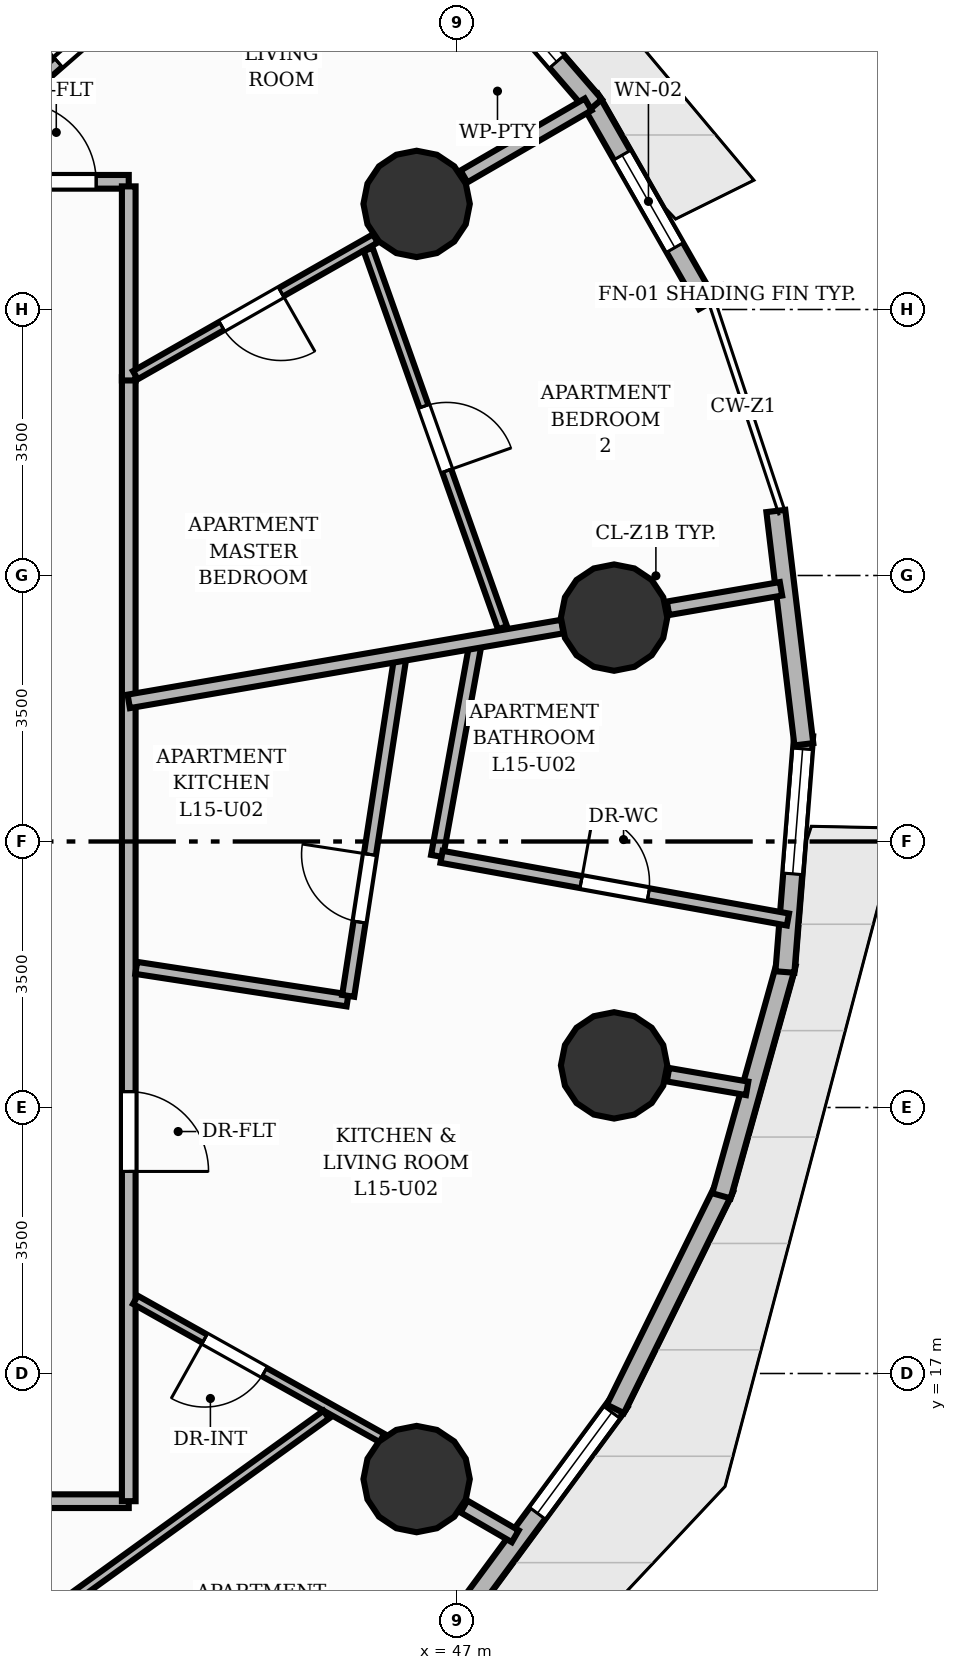
"""IFC4 building model, lengths in metres.
Left out: names, types, materials, properties, quantities, classifications, styles, units other than length and angle.
Written with IfcOpenShell. Run it as: python <this file> out.ifc"""

import sys

from ifc_helpers import new_model, si_unit, direction, frame, frame_2d, origin, origin_2d, place, context, subcontext, project, spatial, rectangle, circle, extrude, element, fill, save


model = new_model("IFC4")
c1 = context("Model", 3, precision=1e-05, world=origin(), true_north=direction((0.0, 1.0)))
c2 = subcontext(c1, "Body", "Model", "MODEL_VIEW")
j1 = project(units=[si_unit("LENGTHUNIT", "METRE"), si_unit("PLANEANGLEUNIT", "RADIAN")], contexts=[c1])
p1 = place(None, origin())
s1 = spatial("IfcSite", under=j1, at=p1, CompositionType="ELEMENT")
p2 = place(p1, origin())
s2 = spatial("IfcBuilding", under=s1, at=p2, CompositionType="ELEMENT")
p3 = place(p2, frame((0.0, 0.0, 53.6)))
s3 = spatial("IfcBuildingStorey", under=s2, at=p3, CompositionType="ELEMENT", Elevation=53.6)
for number, where, z_axis, x_axis in (
    (1, (49.066, 26.946, 0.0), (0.0, 0.0, 1.0), (1.0, 0.0, 0.0)),
    (2, (46.468, 32.389, 0.0), (0.0, 0.0, 1.0), (1.0, 0.0, 0.0)),
    (3, (46.468, 15.611, 0.0), (0.0, 0.0, 1.0), (1.0, 0.0, 0.0)),
    (4, (49.066, 21.054, 0.0), (0.0, 0.0, 1.0), (1.0, 0.0, 0.0)),
):
    element("IfcColumn", number, at=place(p3, frame(where, z_axis=z_axis, x_axis=x_axis)), inside=s3, PredefinedType="COLUMN", context=c2, shape_type="SweptSolid", body=[
        extrude(circle(Radius=0.7, at=origin_2d()), origin(), (0.0, 0.0, 1.0), 3.2),
    ])
p4 = place(p3, frame((48.744, 33.777, 0.0), z_axis=(0.0, 0.0, 1.0), x_axis=(0.496155788519, -0.868233513243, 0.0)))
e5 = element("IfcWall", 5, at=p4, inside=s3, PredefinedType="SOLIDWALL", context=c2, shape_type="SweptSolid", body=[
    extrude(rectangle(XDim=3.121, YDim=0.25, at=frame_2d((1.56, 0.0))), origin(), (0.0, 0.0, 1.0), 2.96),
])
p5 = place(p4, frame((0.86, 0.0, 0.85)))
e6 = element("IfcOpeningElement", 6, at=p5, cuts=e5, PredefinedType="OPENING", context=c2, shape_type="SweptSolid", body=[
    extrude(rectangle(XDim=1.4, YDim=1.55, at=frame_2d((0.7, 0.775))), frame((0.0, 0.135, 0.0), z_axis=(0.0, -1.0, 0.0), x_axis=(1.0, 0.0, 0.0)), (0.0, 0.0, 1.0), 0.27),
])
p6 = place(p3, frame((46.734, 36.086, 0.0), z_axis=(0.0, 0.0, 1.0), x_axis=(0.653770062489, -0.75669327035, 0.0)))
e7 = element("IfcWall", 7, at=p6, inside=s3, PredefinedType="SOLIDWALL", context=c2, shape_type="SweptSolid", body=[
    extrude(rectangle(XDim=3.174, YDim=0.25, at=frame_2d((1.587, 0.0))), origin(), (0.0, 0.0, 1.0), 2.96),
])
p7 = place(p6, frame((0.762, 0.0, 0.85)))
e8 = element("IfcOpeningElement", 8, at=p7, cuts=e7, PredefinedType="OPENING", context=c2, shape_type="SweptSolid", body=[
    extrude(rectangle(XDim=1.65, YDim=1.55, at=frame_2d((0.825, 0.775))), frame((0.0, 0.135, 0.0), z_axis=(0.0, -1.0, 0.0), x_axis=(1.0, 0.0, 0.0)), (0.0, 0.0, 1.0), 0.27),
])
p8 = place(p3, frame((49.14, 16.629, 0.0), z_axis=(0.0, 0.0, 1.0), x_axis=(-0.593762827217, -0.804640109003, 0.0)))
e9 = element("IfcWall", 9, at=p8, inside=s3, PredefinedType="SOLIDWALL", context=c2, shape_type="SweptSolid", body=[
    extrude(rectangle(XDim=3.323, YDim=0.25, at=frame_2d((1.661, 0.0))), origin(), (0.0, 0.0, 1.0), 2.96),
])
p9 = place(p8, frame((0.175, 0.0, 0.85)))
e10 = element("IfcOpeningElement", 10, at=p9, cuts=e9, PredefinedType="OPENING", context=c2, shape_type="SweptSolid", body=[
    extrude(rectangle(XDim=1.65, YDim=1.55, at=frame_2d((0.825, 0.775))), frame((0.0, 0.135, 0.0), z_axis=(0.0, -1.0, 0.0), x_axis=(1.0, 0.0, 0.0)), (0.0, 0.0, 1.0), 0.27),
])
p10 = place(p3, frame((50.518, 19.443, 0.0), z_axis=(0.0, 0.0, 1.0), x_axis=(-0.44260255462, -0.896717892452, 0.0)))
e11 = element("IfcWall", 11, at=p10, inside=s3, PredefinedType="SOLIDWALL", context=c2, shape_type="SweptSolid", body=[
    extrude(rectangle(XDim=3.245, YDim=0.25, at=frame_2d((1.622, 0.0))), origin(), (0.0, 0.0, 1.0), 2.96),
])
p11 = place(p3, frame((51.333, 22.395, 0.0), z_axis=(0.0, 0.0, 1.0), x_axis=(-0.269353183383, -0.963041464632, 0.0)))
e12 = element("IfcWall", 12, at=p11, inside=s3, PredefinedType="SOLIDWALL", context=c2, shape_type="SweptSolid", body=[
    extrude(rectangle(XDim=3.174, YDim=0.25, at=frame_2d((1.587, 0.0))), origin(), (0.0, 0.0, 1.0), 2.96),
])
p12 = place(p3, frame((51.56, 25.394, 0.0), z_axis=(0.0, 0.0, 1.0), x_axis=(-0.079173066737, -0.996860885733, 0.0)))
e13 = element("IfcWall", 13, at=p12, inside=s3, PredefinedType="SOLIDWALL", context=c2, shape_type="SweptSolid", body=[
    extrude(rectangle(XDim=3.121, YDim=0.25, at=frame_2d((1.56, 0.0))), origin(), (0.0, 0.0, 1.0), 2.96),
])
p13 = place(p12, frame((0.175, 0.0, 0.85)))
e14 = element("IfcOpeningElement", 14, at=p13, cuts=e13, PredefinedType="OPENING", context=c2, shape_type="SweptSolid", body=[
    extrude(rectangle(XDim=1.65, YDim=1.55, at=frame_2d((0.825, 0.775))), frame((0.0, 0.135, 0.0), z_axis=(0.0, -1.0, 0.0), x_axis=(1.0, 0.0, 0.0)), (0.0, 0.0, 1.0), 0.27),
])
p14 = place(p3, frame((51.194, 28.349, 0.0), z_axis=(0.0, 0.0, 1.0), x_axis=(0.119310240224, -0.992857022223, 0.0)))
e15 = element("IfcWall", 15, at=p14, inside=s3, PredefinedType="SOLIDWALL", context=c2, shape_type="SweptSolid", body=[
    extrude(rectangle(XDim=3.092, YDim=0.25, at=frame_2d((1.546, 0.0))), origin(), (0.0, 0.0, 1.0), 2.96),
])
p15 = place(p3, frame((49.775, 27.068, 0.0), z_axis=(0.0, 0.0, 1.0), x_axis=(0.985418960314, 0.170145445587, 0.0)))
e16 = element("IfcWall", 16, at=p15, inside=s3, PredefinedType="PARTITIONING", context=c2, shape_type="SweptSolid", body=[
    extrude(rectangle(XDim=1.508, YDim=0.18, at=frame_2d((0.754, 0.0))), origin(), (0.0, 0.0, 1.0), 2.178),
])
p16 = place(p3, frame((47.091, 32.75, 0.0), z_axis=(0.0, 0.0, 1.0), x_axis=(0.865027823723, 0.501723892379, 0.0)))
e17 = element("IfcWall", 17, at=p16, inside=s3, PredefinedType="PARTITIONING", context=c2, shape_type="SweptSolid", body=[
    extrude(rectangle(XDim=1.889, YDim=0.18, at=frame_2d((0.944, 0.0))), origin(), (0.0, 0.0, 1.0), 2.178),
])
p17 = place(p3, frame((47.091, 15.25, 0.0), z_axis=(0.0, 0.0, 1.0), x_axis=(0.86504748832, -0.501689986895, 0.0)))
e18 = element("IfcWall", 18, at=p17, inside=s3, PredefinedType="PARTITIONING", context=c2, shape_type="SweptSolid", body=[
    extrude(rectangle(XDim=0.78, YDim=0.18, at=frame_2d((0.39, 0.0))), origin(), (0.0, 0.0, 1.0), 2.178),
])
p18 = place(p3, frame((49.775, 20.932, 0.0), z_axis=(0.0, 0.0, 1.0), x_axis=(0.985428074572, -0.17009265077, 0.0)))
e19 = element("IfcWall", 19, at=p18, inside=s3, PredefinedType="PARTITIONING", context=c2, shape_type="SweptSolid", body=[
    extrude(rectangle(XDim=1.056, YDim=0.18, at=frame_2d((0.528, 0.0))), origin(), (0.0, 0.0, 1.0), 2.178),
])
p19 = place(p3, frame((42.68, 15.32, 0.0), z_axis=(0.0, 0.0, 1.0), x_axis=(-1.0, 0.0, 0.0)))
e20 = element("IfcWall", 20, at=p19, inside=s3, PredefinedType="PARTITIONING", context=c2, shape_type="SweptSolid", body=[
    extrude(rectangle(XDim=13.87, YDim=0.18, at=frame_2d((6.935, 0.0))), origin(), (0.0, 0.0, 1.0), 2.955),
])
p20 = place(p19, frame((9.866, 0.0, 0.0)))
e21 = element("IfcOpeningElement", 21, at=p20, cuts=e20, PredefinedType="OPENING", context=c2, shape_type="SweptSolid", body=[
    extrude(rectangle(XDim=0.9, YDim=2.1, at=frame_2d((0.45, 1.05))), frame((0.0, 0.1, 0.0), z_axis=(0.0, -1.0, 0.0), x_axis=(1.0, 0.0, 0.0)), (0.0, 0.0, 1.0), 0.2),
])
p21 = place(p3, frame((42.68, 30.109, 0.0), z_axis=(0.0, 0.0, 1.0), x_axis=(0.0, -1.0, 0.0)))
e22 = element("IfcWall", 22, at=p21, inside=s3, PredefinedType="PARTITIONING", context=c2, shape_type="SweptSolid", body=[
    extrude(rectangle(XDim=14.789, YDim=0.18, at=frame_2d((7.395, 0.0))), origin(), (0.0, 0.0, 1.0), 2.955),
])
p22 = place(p21, frame((9.4, 0.0, 0.0)))
e23 = element("IfcOpeningElement", 23, at=p22, cuts=e22, PredefinedType="OPENING", context=c2, shape_type="SweptSolid", body=[
    extrude(rectangle(XDim=1.05, YDim=2.15, at=frame_2d((0.525, 1.075))), frame((0.0, 0.1, 0.0), z_axis=(0.0, -1.0, 0.0), x_axis=(1.0, 0.0, 0.0)), (0.0, 0.0, 1.0), 0.2),
])
p23 = place(p3, frame((33.988, 32.68, 0.0), z_axis=(0.0, 0.0, 1.0), x_axis=(1.0, 0.0, 0.0)))
e24 = element("IfcWall", 24, at=p23, inside=s3, PredefinedType="PARTITIONING", context=c2, shape_type="SweptSolid", body=[
    extrude(rectangle(XDim=8.692, YDim=0.18, at=frame_2d((4.346, 0.0))), origin(), (0.0, 0.0, 1.0), 2.955),
])
p24 = place(p23, frame((7.213, 0.0, 0.0)))
e25 = element("IfcOpeningElement", 25, at=p24, cuts=e24, PredefinedType="OPENING", context=c2, shape_type="SweptSolid", body=[
    extrude(rectangle(XDim=1.05, YDim=2.15, at=frame_2d((0.525, 1.075))), frame((0.0, 0.1, 0.0), z_axis=(0.0, -1.0, 0.0), x_axis=(1.0, 0.0, 0.0)), (0.0, 0.0, 1.0), 0.2),
])
p25 = place(p3, frame((42.68, 32.62, 0.0), z_axis=(0.0, 0.0, 1.0), x_axis=(0.0, -1.0, 0.0)))
e26 = element("IfcWall", 26, at=p25, inside=s3, PredefinedType="PARTITIONING", context=c2, shape_type="SweptSolid", body=[
    extrude(rectangle(XDim=2.554, YDim=0.18, at=frame_2d((1.277, 0.0))), origin(), (0.0, 0.0, 1.0), 2.955),
])
p26 = place(p3, frame((47.248, 26.632, 0.0), z_axis=(0.0, 0.0, 1.0), x_axis=(-0.1781964362, -0.983994933994, 0.0)))
e27 = element("IfcWall", 27, at=p26, inside=s3, PredefinedType="PLUMBINGWALL", context=c2, shape_type="SweptSolid", body=[
    extrude(rectangle(XDim=2.869, YDim=0.16, at=frame_2d((1.435, 0.0))), origin(), (0.0, 0.0, 1.0), 2.955),
])
p27 = place(p3, frame((46.796, 23.799, 0.0), z_axis=(0.0, 0.0, 1.0), x_axis=(0.983988618973, -0.178231304015, 0.0)))
e28 = element("IfcWall", 28, at=p27, inside=s3, PredefinedType="PLUMBINGWALL", context=c2, shape_type="SweptSolid", body=[
    extrude(rectangle(XDim=4.631, YDim=0.16, at=frame_2d((2.316, 0.0))), origin(), (0.0, 0.0, 1.0), 2.955),
])
p28 = place(p27, frame((1.866, 0.0, 0.0)))
e29 = element("IfcOpeningElement", 29, at=p28, cuts=e28, PredefinedType="OPENING", context=c2, shape_type="SweptSolid", body=[
    extrude(rectangle(XDim=0.9, YDim=2.1, at=frame_2d((0.45, 1.05))), frame((0.0, 0.09, 0.0), z_axis=(0.0, -1.0, 0.0), x_axis=(1.0, 0.0, 0.0)), (0.0, 0.0, 1.0), 0.18),
])
p29 = place(p3, frame((46.011, 16.152, 0.0), z_axis=(0.0, 0.0, 1.0), x_axis=(-0.872501537555, 0.488611365978, 0.0)))
e30 = element("IfcWall", 30, at=p29, inside=s3, PredefinedType="PARTITIONING", context=c2, shape_type="SweptSolid", body=[
    extrude(rectangle(XDim=3.719, YDim=0.125, at=frame_2d((1.859, 0.0))), origin(), (0.0, 0.0, 1.0), 2.178),
])
p30 = place(p29, frame((1.773, 0.0, 0.0)))
e31 = element("IfcOpeningElement", 31, at=p30, cuts=e30, PredefinedType="OPENING", context=c2, shape_type="SweptSolid", body=[
    extrude(rectangle(XDim=0.9, YDim=2.1, at=frame_2d((0.45, 1.05))), frame((0.0, 0.073, 0.0), z_axis=(0.0, -1.0, 0.0), x_axis=(1.0, 0.0, 0.0)), (0.0, 0.0, 1.0), 0.145),
])
p31 = place(p3, frame((42.779, 22.337, 0.0), z_axis=(0.0, 0.0, 1.0), x_axis=(0.9883767157, -0.152024563351, 0.0)))
e32 = element("IfcWall", 32, at=p31, inside=s3, PredefinedType="PLUMBINGWALL", context=c2, shape_type="SweptSolid", body=[
    extrude(rectangle(XDim=2.812, YDim=0.16, at=frame_2d((1.406, 0.0))), origin(), (0.0, 0.0, 1.0), 2.178),
])
p32 = place(p3, frame((45.567, 21.969, 0.0), z_axis=(0.0, 0.0, 1.0), x_axis=(0.152061220482, 0.988371076684, 0.0)))
e33 = element("IfcWall", 33, at=p32, inside=s3, PredefinedType="PLUMBINGWALL", context=c2, shape_type="SweptSolid", body=[
    extrude(rectangle(XDim=4.545, YDim=0.16, at=frame_2d((2.273, 0.0))), origin(), (0.0, 0.0, 1.0), 2.955),
])
p33 = place(p32, frame((0.983, 0.0, 0.0)))
e34 = element("IfcOpeningElement", 34, at=p33, cuts=e33, PredefinedType="OPENING", context=c2, shape_type="SweptSolid", body=[
    extrude(rectangle(XDim=0.9, YDim=2.1, at=frame_2d((0.45, 1.05))), frame((0.0, 0.09, 0.0), z_axis=(0.0, -1.0, 0.0), x_axis=(1.0, 0.0, 0.0)), (0.0, 0.0, 1.0), 0.18),
])
p34 = place(p3, frame((42.68, 25.844, 0.0), z_axis=(0.0, 0.0, 1.0), x_axis=(0.985422105898, 0.170127226534, 0.0)))
e35 = element("IfcWall", 35, at=p34, inside=s3, PredefinedType="PARTITIONING", context=c2, shape_type="SweptSolid", body=[
    extrude(rectangle(XDim=5.789, YDim=0.18, at=frame_2d((2.895, 0.0))), origin(), (0.0, 0.0, 1.0), 2.178),
])
p35 = place(p3, frame((45.278, 16.459, 0.0), z_axis=(0.0, 0.0, 1.0), x_axis=(-0.810668637761, -0.585505217526, 0.0)))
e36 = element("IfcWall", 36, at=p35, inside=s3, PredefinedType="PARTITIONING", context=c2, shape_type="SweptSolid", body=[
    extrude(rectangle(XDim=11.55, YDim=0.125, at=frame_2d((5.775, 0.0))), origin(), (0.0, 0.0, 1.0), 2.955),
])
p36 = place(p35, frame((4.625, 0.0, 0.0)))
e37 = element("IfcOpeningElement", 37, at=p36, cuts=e36, PredefinedType="OPENING", context=c2, shape_type="SweptSolid", body=[
    extrude(rectangle(XDim=0.9, YDim=2.1, at=frame_2d((0.45, 1.05))), frame((0.0, 0.073, 0.0), z_axis=(0.0, -1.0, 0.0), x_axis=(1.0, 0.0, 0.0)), (0.0, 0.0, 1.0), 0.145),
])
p37 = place(p3, frame((40.028, 32.746, 0.0), z_axis=(0.0, 0.0, 1.0), x_axis=(0.753328390337, 0.657644536442, 0.0)))
e38 = element("IfcWall", 38, at=p37, inside=s3, PredefinedType="PLUMBINGWALL", context=c2, shape_type="SweptSolid", body=[
    extrude(rectangle(XDim=6.876, YDim=0.16, at=frame_2d((3.438, 0.0))), origin(), (0.0, 0.0, 1.0), 2.955),
])
p38 = place(p37, frame((2.288, 0.0, 0.0)))
e39 = element("IfcOpeningElement", 39, at=p38, cuts=e38, PredefinedType="OPENING", context=c2, shape_type="SweptSolid", body=[
    extrude(rectangle(XDim=0.9, YDim=2.1, at=frame_2d((0.45, 1.05))), frame((0.0, 0.09, 0.0), z_axis=(0.0, -1.0, 0.0), x_axis=(1.0, 0.0, 0.0)), (0.0, 0.0, 1.0), 0.18),
])
p39 = place(p3, frame((45.925, 31.936, 0.0), z_axis=(0.0, 0.0, 1.0), x_axis=(-0.868837650683, -0.49509709831, 0.0)))
e40 = element("IfcWall", 40, at=p39, inside=s3, PredefinedType="PARTITIONING", context=c2, shape_type="SweptSolid", body=[
    extrude(rectangle(XDim=3.635, YDim=0.125, at=frame_2d((1.818, 0.0))), origin(), (0.0, 0.0, 1.0), 2.178),
])
p40 = place(p39, frame((1.428, 0.0, 0.0)))
e41 = element("IfcOpeningElement", 41, at=p40, cuts=e40, PredefinedType="OPENING", context=c2, shape_type="SweptSolid", body=[
    extrude(rectangle(XDim=0.9, YDim=2.1, at=frame_2d((0.45, 1.05))), frame((0.0, 0.073, 0.0), z_axis=(0.0, -1.0, 0.0), x_axis=(1.0, 0.0, 0.0)), (0.0, 0.0, 1.0), 0.145),
])
p41 = place(p3, frame((45.83, 31.79, 0.0), z_axis=(0.0, 0.0, 1.0), x_axis=(0.334664074365, -0.94233749651, 0.0)))
e42 = element("IfcWall", 42, at=p41, inside=s3, PredefinedType="PARTITIONING", context=c2, shape_type="SweptSolid", body=[
    extrude(rectangle(XDim=5.282, YDim=0.125, at=frame_2d((2.641, 0.0))), origin(), (0.0, 0.0, 1.0), 2.955),
])
p42 = place(p41, frame((2.191, 0.0, 0.0)))
e43 = element("IfcOpeningElement", 43, at=p42, cuts=e42, PredefinedType="OPENING", context=c2, shape_type="SweptSolid", body=[
    extrude(rectangle(XDim=0.9, YDim=2.1, at=frame_2d((0.45, 1.05))), frame((0.0, 0.073, 0.0), z_axis=(0.0, -1.0, 0.0), x_axis=(1.0, 0.0, 0.0)), (0.0, 0.0, 1.0), 0.145),
])
p43 = place(p5, origin())
e44 = element("IfcWindow", 44, at=p43, inside=s3, PartitioningType="SINGLE_PANEL", PredefinedType="WINDOW", context=c2, shape_type="SweptSolid", body=[
    extrude(rectangle(XDim=1.4, YDim=1.55, at=frame_2d((0.7, 0.775))), frame((0.0, 0.03, 0.0), z_axis=(0.0, -1.0, 0.0), x_axis=(1.0, 0.0, 0.0)), (0.0, 0.0, 1.0), 0.06),
])
fill(e6, e44)
p44 = place(p7, origin())
e45 = element("IfcWindow", 45, at=p44, inside=s3, PartitioningType="SINGLE_PANEL", PredefinedType="WINDOW", context=c2, shape_type="SweptSolid", body=[
    extrude(rectangle(XDim=1.65, YDim=1.55, at=frame_2d((0.825, 0.775))), frame((0.0, 0.03, 0.0), z_axis=(0.0, -1.0, 0.0), x_axis=(1.0, 0.0, 0.0)), (0.0, 0.0, 1.0), 0.06),
])
fill(e8, e45)
p45 = place(p9, origin())
e46 = element("IfcWindow", 46, at=p45, inside=s3, PartitioningType="SINGLE_PANEL", PredefinedType="WINDOW", context=c2, shape_type="SweptSolid", body=[
    extrude(rectangle(XDim=1.65, YDim=1.55, at=frame_2d((0.825, 0.775))), frame((0.0, 0.03, 0.0), z_axis=(0.0, -1.0, 0.0), x_axis=(1.0, 0.0, 0.0)), (0.0, 0.0, 1.0), 0.06),
])
fill(e10, e46)
p46 = place(p13, origin())
e47 = element("IfcWindow", 47, at=p46, inside=s3, PartitioningType="SINGLE_PANEL", PredefinedType="WINDOW", context=c2, shape_type="SweptSolid", body=[
    extrude(rectangle(XDim=1.65, YDim=1.55, at=frame_2d((0.825, 0.775))), frame((0.0, 0.03, 0.0), z_axis=(0.0, -1.0, 0.0), x_axis=(1.0, 0.0, 0.0)), (0.0, 0.0, 1.0), 0.06),
])
fill(e14, e47)
p47 = place(p22, origin())
e48 = element("IfcDoor", 48, at=p47, inside=s3, OperationType="SINGLE_SWING_RIGHT", PredefinedType="DOOR", context=c2, shape_type="SweptSolid", body=[
    extrude(rectangle(XDim=1.05, YDim=2.15, at=frame_2d((0.525, 1.075))), frame((0.0, 0.025, 0.0), z_axis=(0.0, -1.0, 0.0), x_axis=(1.0, 0.0, 0.0)), (0.0, 0.0, 1.0), 0.05),
])
fill(e23, e48)
p48 = place(p28, origin())
e49 = element("IfcDoor", 49, at=p48, inside=s3, OperationType="SINGLE_SWING_LEFT", PredefinedType="DOOR", context=c2, shape_type="SweptSolid", body=[
    extrude(rectangle(XDim=0.9, YDim=2.1, at=frame_2d((0.45, 1.05))), frame((0.0, 0.025, 0.0), z_axis=(0.0, -1.0, 0.0), x_axis=(1.0, 0.0, 0.0)), (0.0, 0.0, 1.0), 0.05),
])
fill(e29, e49)
p49 = place(p30, origin())
e50 = element("IfcDoor", 50, at=p49, inside=s3, OperationType="SINGLE_SWING_RIGHT", PredefinedType="DOOR", context=c2, shape_type="SweptSolid", body=[
    extrude(rectangle(XDim=0.9, YDim=2.1, at=frame_2d((0.45, 1.05))), frame((0.0, 0.025, 0.0), z_axis=(0.0, -1.0, 0.0), x_axis=(1.0, 0.0, 0.0)), (0.0, 0.0, 1.0), 0.05),
])
fill(e31, e50)
p50 = place(p33, origin())
e51 = element("IfcDoor", 51, at=p50, inside=s3, OperationType="SINGLE_SWING_RIGHT", PredefinedType="DOOR", context=c2, shape_type="SweptSolid", body=[
    extrude(rectangle(XDim=0.9, YDim=2.1, at=frame_2d((0.45, 1.05))), frame((0.0, 0.025, 0.0), z_axis=(0.0, -1.0, 0.0), x_axis=(1.0, 0.0, 0.0)), (0.0, 0.0, 1.0), 0.05),
])
fill(e34, e51)
p51 = place(p24, origin())
e52 = element("IfcDoor", 52, at=p51, inside=s3, OperationType="SINGLE_SWING_LEFT", PredefinedType="DOOR", context=c2, shape_type="SweptSolid", body=[
    extrude(rectangle(XDim=1.05, YDim=2.15, at=frame_2d((0.525, 1.075))), frame((0.0, 0.025, 0.0), z_axis=(0.0, -1.0, 0.0), x_axis=(1.0, 0.0, 0.0)), (0.0, 0.0, 1.0), 0.05),
])
fill(e25, e52)
p52 = place(p38, origin())
e53 = element("IfcDoor", 53, at=p52, inside=s3, OperationType="SINGLE_SWING_RIGHT", PredefinedType="DOOR", context=c2, shape_type="SweptSolid", body=[
    extrude(rectangle(XDim=0.9, YDim=2.1, at=frame_2d((0.45, 1.05))), frame((0.0, 0.025, 0.0), z_axis=(0.0, -1.0, 0.0), x_axis=(1.0, 0.0, 0.0)), (0.0, 0.0, 1.0), 0.05),
])
fill(e39, e53)
p53 = place(p40, origin())
e54 = element("IfcDoor", 54, at=p53, inside=s3, OperationType="SINGLE_SWING_LEFT", PredefinedType="DOOR", context=c2, shape_type="SweptSolid", body=[
    extrude(rectangle(XDim=0.9, YDim=2.1, at=frame_2d((0.45, 1.05))), frame((0.0, 0.025, 0.0), z_axis=(0.0, -1.0, 0.0), x_axis=(1.0, 0.0, 0.0)), (0.0, 0.0, 1.0), 0.05),
])
fill(e41, e54)
p54 = place(p42, origin())
e55 = element("IfcDoor", 55, at=p54, inside=s3, OperationType="SINGLE_SWING_RIGHT", PredefinedType="DOOR", context=c2, shape_type="SweptSolid", body=[
    extrude(rectangle(XDim=0.9, YDim=2.1, at=frame_2d((0.45, 1.05))), frame((0.0, 0.025, 0.0), z_axis=(0.0, -1.0, 0.0), x_axis=(1.0, 0.0, 0.0)), (0.0, 0.0, 1.0), 0.05),
])
fill(e43, e55)
save(model, sys.argv[1])
